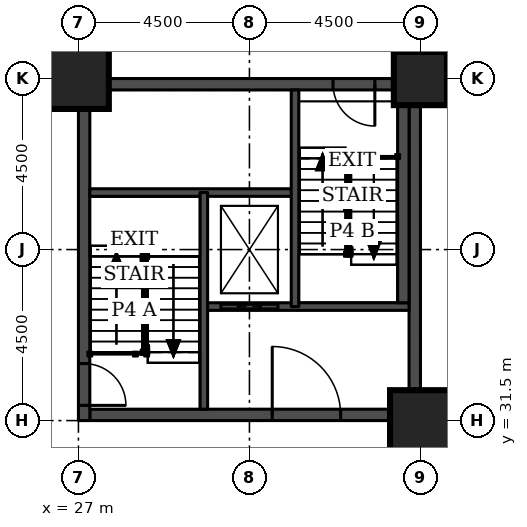
"""IFC4 building model, lengths in metres.
Left out: names, types, materials, properties, quantities, classifications, styles, units other than length and angle.
Written with IfcOpenShell. Run it as: python <this file> out.ifc"""

import sys

from ifc_helpers import new_model, si_unit, direction, frame, frame_2d, origin, origin_2d, place, context, subcontext, project, spatial, rectangle, extrude, element, fill, save


model = new_model("IFC4")
c1 = context("Model", 3, precision=1e-05, world=origin(), true_north=direction((0.0, 1.0)))
c2 = subcontext(c1, "Body", "Model", "MODEL_VIEW")
j1 = project(units=[si_unit("LENGTHUNIT", "METRE"), si_unit("PLANEANGLEUNIT", "RADIAN")], contexts=[c1])
p1 = place(None, origin())
s1 = spatial("IfcSite", under=j1, at=p1, CompositionType="ELEMENT")
p2 = place(p1, origin())
s2 = spatial("IfcBuilding", under=s1, at=p2, CompositionType="ELEMENT")
p3 = place(p2, frame((0.0, 0.0, 13.5)))
s3 = spatial("IfcBuildingStorey", under=s2, at=p3, CompositionType="ELEMENT", Elevation=13.5)
for number, where, z_axis, x_axis in (
    (1, (36.0, 31.5, 0.0), (0.0, 0.0, 1.0), (1.0, 0.0, 0.0)),
    (2, (27.0, 40.5, 0.0), (0.0, 0.0, 1.0), (1.0, 0.0, 0.0)),
):
    element("IfcColumn", number, at=place(p3, frame(where, z_axis=z_axis, x_axis=x_axis)), inside=s3, PredefinedType="COLUMN", context=c2, shape_type="SweptSolid", body=[
        extrude(rectangle(XDim=1.6, YDim=1.6, at=origin_2d()), origin(), (0.0, 0.0, 1.0), 5.0),
    ])
p4 = place(p3, frame((36.0, 40.5, 0.0), z_axis=(0.0, 0.0, 1.0), x_axis=(1.0, 0.0, 0.0)))
e3 = element("IfcColumn", 3, at=p4, inside=s3, PredefinedType="COLUMN", context=c2, shape_type="SweptSolid", body=[
    extrude(rectangle(XDim=1.4, YDim=1.4, at=origin_2d()), origin(), (0.0, 0.0, 1.0), 5.0),
])
p5 = place(p3, frame((27.3, 31.65, 0.0), z_axis=(0.0, 0.0, 1.0), x_axis=(1.0, 0.0, 0.0)))
e4 = element("IfcWall", 4, at=p5, inside=s3, PredefinedType="SHEAR", context=c2, shape_type="SweptSolid", body=[
    extrude(rectangle(XDim=8.4, YDim=0.3, at=frame_2d((4.2, 0.0))), origin(), (0.0, 0.0, 1.0), 5.0),
])
p6 = place(p5, frame((4.8, 0.0, 0.0)))
e5 = element("IfcOpeningElement", 5, at=p6, cuts=e4, PredefinedType="OPENING", context=c2, shape_type="SweptSolid", body=[
    extrude(rectangle(XDim=1.8, YDim=2.1, at=frame_2d((0.9, 1.05))), frame((0.0, 0.16, 0.0), z_axis=(0.0, -1.0, 0.0), x_axis=(1.0, 0.0, 0.0)), (0.0, 0.0, 1.0), 0.32),
])
p7 = place(p3, frame((27.3, 40.35, 0.0), z_axis=(0.0, 0.0, 1.0), x_axis=(1.0, 0.0, 0.0)))
e6 = element("IfcWall", 6, at=p7, inside=s3, PredefinedType="SHEAR", context=c2, shape_type="SweptSolid", body=[
    extrude(rectangle(XDim=8.4, YDim=0.3, at=frame_2d((4.2, 0.0))), origin(), (0.0, 0.0, 1.0), 5.0),
])
p8 = place(p7, frame((6.4, 0.0, 0.0)))
e7 = element("IfcOpeningElement", 7, at=p8, cuts=e6, PredefinedType="OPENING", context=c2, shape_type="SweptSolid", body=[
    extrude(rectangle(XDim=1.1, YDim=2.1, at=frame_2d((0.55, 1.05))), frame((0.0, 0.16, 0.0), z_axis=(0.0, -1.0, 0.0), x_axis=(1.0, 0.0, 0.0)), (0.0, 0.0, 1.0), 0.32),
])
p9 = place(p3, frame((27.15, 31.5, 0.0), z_axis=(0.0, 0.0, 1.0), x_axis=(0.0, 1.0, 0.0)))
e8 = element("IfcWall", 8, at=p9, inside=s3, PredefinedType="SHEAR", context=c2, shape_type="SweptSolid", body=[
    extrude(rectangle(XDim=9.0, YDim=0.3, at=frame_2d((4.5, 0.0))), origin(), (0.0, 0.0, 1.0), 5.0),
])
p10 = place(p9, frame((0.4, 0.0, 0.0)))
e9 = element("IfcOpeningElement", 9, at=p10, cuts=e8, PredefinedType="OPENING", context=c2, shape_type="SweptSolid", body=[
    extrude(rectangle(XDim=1.1, YDim=2.1, at=frame_2d((0.55, 1.05))), frame((0.0, 0.16, 0.0), z_axis=(0.0, -1.0, 0.0), x_axis=(1.0, 0.0, 0.0)), (0.0, 0.0, 1.0), 0.32),
])
p11 = place(p3, frame((35.85, 31.5, 0.0), z_axis=(0.0, 0.0, 1.0), x_axis=(0.0, 1.0, 0.0)))
e10 = element("IfcWall", 10, at=p11, inside=s3, PredefinedType="SHEAR", context=c2, shape_type="SweptSolid", body=[
    extrude(rectangle(XDim=9.0, YDim=0.3, at=frame_2d((4.5, 0.0))), origin(), (0.0, 0.0, 1.0), 5.0),
])
p12 = place(p3, frame((30.3, 34.5, 0.0), z_axis=(0.0, 0.0, 1.0), x_axis=(1.0, 0.0, 0.0)))
e11 = element("IfcWall", 11, at=p12, inside=s3, PredefinedType="SOLIDWALL", context=c2, shape_type="SweptSolid", body=[
    extrude(rectangle(XDim=5.4, YDim=0.2, at=frame_2d((2.7, 0.0))), origin(), (0.0, 0.0, 1.0), 4.78),
])
p13 = place(p12, frame((0.45, 0.0, 0.0)))
e12 = element("IfcOpeningElement", 12, at=p13, cuts=e11, PredefinedType="OPENING", context=c2, shape_type="SweptSolid", body=[
    extrude(rectangle(XDim=1.5, YDim=2.1, at=frame_2d((0.75, 1.05))), frame((0.0, 0.11, 0.0), z_axis=(0.0, -1.0, 0.0), x_axis=(1.0, 0.0, 0.0)), (0.0, 0.0, 1.0), 0.22),
])
p14 = place(p3, frame((27.3, 37.5, 0.0), z_axis=(0.0, 0.0, 1.0), x_axis=(1.0, 0.0, 0.0)))
e13 = element("IfcWall", 13, at=p14, inside=s3, PredefinedType="SOLIDWALL", context=c2, shape_type="SweptSolid", body=[
    extrude(rectangle(XDim=5.4, YDim=0.2, at=frame_2d((2.7, 0.0))), origin(), (0.0, 0.0, 1.0), 4.78),
])
for number, where, z_axis, x_axis in (
    (14, (30.3, 31.8, 0.0), (0.0, 0.0, 1.0), (0.0, 1.0, 0.0)),
    (15, (32.7, 34.5, 0.0), (0.0, 0.0, 1.0), (0.0, 1.0, 0.0)),
):
    element("IfcWall", number, at=place(p3, frame(where, z_axis=z_axis, x_axis=x_axis)), inside=s3, PredefinedType="SOLIDWALL", context=c2, shape_type="SweptSolid", body=[
        extrude(rectangle(XDim=5.7, YDim=0.2, at=frame_2d((2.85, 0.0))), origin(), (0.0, 0.0, 1.0), 4.78),
    ])
p15 = place(p3, frame((35.55, 34.6, 0.0), z_axis=(0.0, 0.0, 1.0), x_axis=(0.0, 1.0, 0.0)))
e16 = element("IfcWall", 16, at=p15, inside=s3, PredefinedType="SOLIDWALL", context=c2, shape_type="SweptSolid", body=[
    extrude(rectangle(XDim=5.6, YDim=0.3, at=frame_2d((2.8, 0.0))), origin(), (0.0, 0.0, 1.0), 4.78),
])
p16 = place(p10, frame((1.1, 0.0, 0.0), z_axis=(0.0, 0.0, 1.0), x_axis=(-1.0, 0.0, 0.0)))
e17 = element("IfcDoor", 17, at=p16, inside=s3, OperationType="SINGLE_SWING_RIGHT", PredefinedType="DOOR", context=c2, shape_type="SweptSolid", body=[
    extrude(rectangle(XDim=1.1, YDim=2.1, at=frame_2d((0.55, 1.05))), frame((0.0, 0.025, 0.0), z_axis=(0.0, -1.0, 0.0), x_axis=(1.0, 0.0, 0.0)), (0.0, 0.0, 1.0), 0.05),
])
fill(e9, e17)
p17 = place(p8, frame((1.1, 0.0, 0.0), z_axis=(0.0, 0.0, 1.0), x_axis=(-1.0, 0.0, 0.0)))
e18 = element("IfcDoor", 18, at=p17, inside=s3, OperationType="SINGLE_SWING_LEFT", PredefinedType="DOOR", context=c2, shape_type="SweptSolid", body=[
    extrude(rectangle(XDim=1.1, YDim=2.1, at=frame_2d((0.55, 1.05))), frame((0.0, 0.025, 0.0), z_axis=(0.0, -1.0, 0.0), x_axis=(1.0, 0.0, 0.0)), (0.0, 0.0, 1.0), 0.05),
])
fill(e7, e18)
p18 = place(p13, origin())
e19 = element("IfcDoor", 19, at=p18, inside=s3, OperationType="DOUBLE_DOOR_SLIDING", PredefinedType="DOOR", context=c2, shape_type="SweptSolid", body=[
    extrude(rectangle(XDim=1.5, YDim=2.1, at=frame_2d((0.75, 1.05))), frame((0.0, 0.025, 0.0), z_axis=(0.0, -1.0, 0.0), x_axis=(1.0, 0.0, 0.0)), (0.0, 0.0, 1.0), 0.05),
])
fill(e12, e19)
p19 = place(p6, origin())
e20 = element("IfcDoor", 20, at=p19, inside=s3, OperationType="SINGLE_SWING_LEFT", PredefinedType="DOOR", context=c2, shape_type="SweptSolid", body=[
    extrude(rectangle(XDim=1.8, YDim=2.1, at=frame_2d((0.9, 1.05))), frame((0.0, 0.025, 0.0), z_axis=(0.0, -1.0, 0.0), x_axis=(1.0, 0.0, 0.0)), (0.0, 0.0, 1.0), 0.05),
])
fill(e5, e20)
save(model, sys.argv[1])
